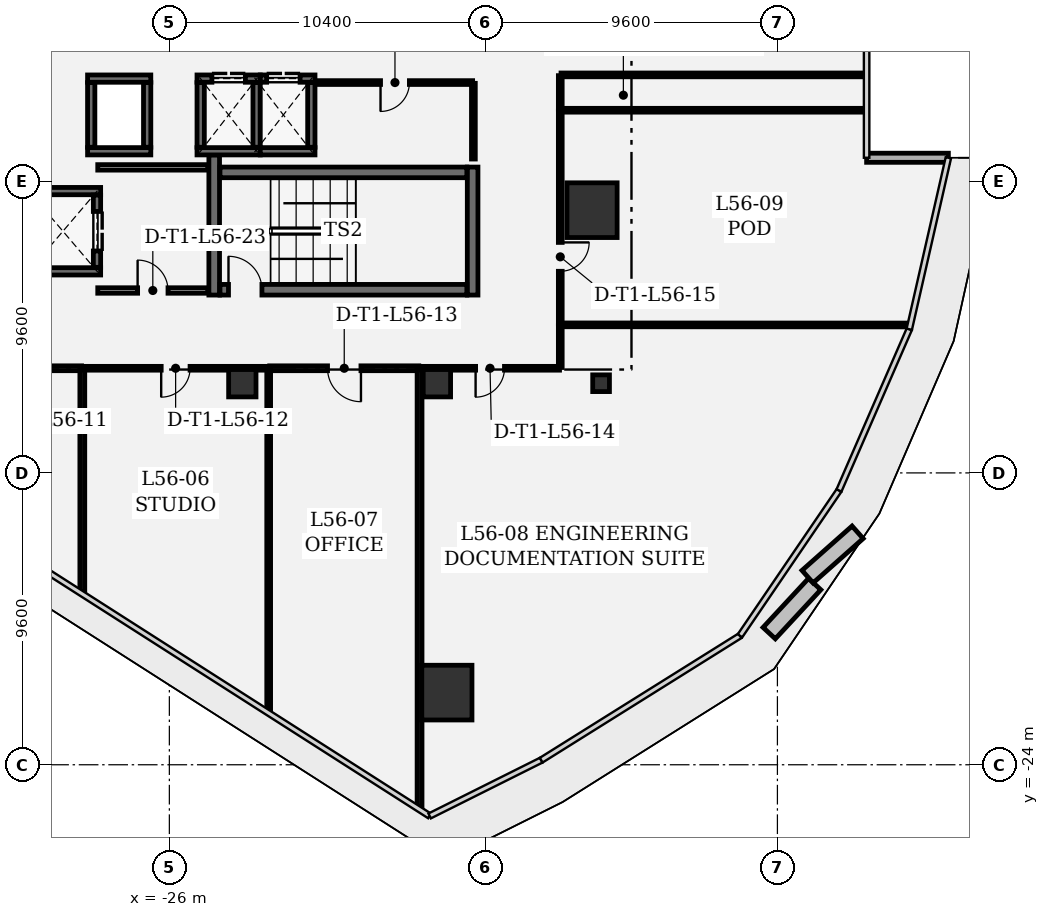
"""IFC4 building model, lengths in metres.
Left out: names, types, materials, properties, quantities, classifications, styles, units other than length and angle.
Written with IfcOpenShell. Run it as: python <this file> out.ifc"""

import sys

from ifc_helpers import new_model, si_unit, direction, frame, frame_2d, origin, origin_2d, place, context, subcontext, project, spatial, rectangle, extrude, element, fill, save


model = new_model("IFC4")
c1 = context("Model", 3, precision=1e-05, world=origin(), true_north=direction((0.0, 1.0)))
c2 = subcontext(c1, "Body", "Model", "MODEL_VIEW")
j1 = project(units=[si_unit("LENGTHUNIT", "METRE"), si_unit("PLANEANGLEUNIT", "RADIAN")], contexts=[c1])
p1 = place(None, origin())
s1 = spatial("IfcSite", under=j1, at=p1, CompositionType="ELEMENT")
p2 = place(p1, origin())
s2 = spatial("IfcBuilding", under=s1, at=p2, CompositionType="ELEMENT")
p3 = place(p2, frame((0.0, 0.0, 241.5)))
s3 = spatial("IfcBuildingStorey", under=s2, at=p3, CompositionType="ELEMENT", Elevation=241.5)
for number, where, z_axis, x_axis in (
    (1, (-16.872, -21.627, 0.0), (0.0, 0.0, 1.0), (1.0, 0.0, 0.0)),
    (2, (-12.097, -5.758, 0.0), (0.0, 0.0, 1.0), (1.0, 0.0, 0.0)),
):
    element("IfcColumn", number, at=place(p3, frame(where, z_axis=z_axis, x_axis=x_axis)), inside=s3, PredefinedType="COLUMN", context=c2, shape_type="SweptSolid", body=[
        extrude(rectangle(XDim=1.65, YDim=1.8, at=origin_2d()), origin(), (0.0, 0.0, 1.0), 4.05),
    ])
for number, where, z_axis, x_axis in (
    (3, (-17.2, -11.45, 0.0), (0.0, 0.0, 1.0), (1.0, 0.0, 0.0)),
    (4, (-23.6, -11.45, 0.0), (0.0, 0.0, 1.0), (1.0, 0.0, 0.0)),
):
    element("IfcColumn", number, at=place(p3, frame(where, z_axis=z_axis, x_axis=x_axis)), inside=s3, PredefinedType="COLUMN", context=c2, shape_type="SweptSolid", body=[
        extrude(rectangle(XDim=0.9, YDim=0.9, at=origin_2d()), origin(), (0.0, 0.0, 1.0), 4.05),
    ])
p4 = place(p3, frame((-11.8, -11.45, 0.0), z_axis=(0.0, 0.0, 1.0), x_axis=(1.0, 0.0, 0.0)))
e5 = element("IfcColumn", 5, at=p4, inside=s3, PredefinedType="COLUMN", context=c2, shape_type="SweptSolid", body=[
    extrude(rectangle(XDim=0.55, YDim=0.55, at=origin_2d()), origin(), (0.0, 0.0, 1.0), 4.05),
])
p5 = place(p3, frame((-0.377, -4.034, 0.0), z_axis=(0.0, 0.0, 1.0), x_axis=(-1.0, 0.0, 0.0)))
e6 = element("IfcWall", 6, at=p5, inside=s3, PredefinedType="SOLIDWALL", context=c2, shape_type="SweptSolid", body=[
    extrude(rectangle(XDim=2.689, YDim=0.3, at=frame_2d((1.345, 0.0))), origin(), (0.0, 0.0, 1.0), 3.78),
])
p6 = place(p3, frame((-24.525, -3.94, 0.0), z_axis=(0.0, 0.0, 1.0), x_axis=(0.0, -1.0, 0.0)))
e7 = element("IfcWall", 7, at=p6, inside=s3, PredefinedType="SHEAR", context=c2, shape_type="SweptSolid", body=[
    extrude(rectangle(XDim=4.61, YDim=0.35, at=frame_2d((2.305, 0.0))), origin(), (0.0, 0.0, 1.0), 3.78),
])
p7 = place(p3, frame((-16.025, -8.55, 0.0), z_axis=(0.0, 0.0, 1.0), x_axis=(0.0, 1.0, 0.0)))
e8 = element("IfcWall", 8, at=p7, inside=s3, PredefinedType="SHEAR", context=c2, shape_type="SweptSolid", body=[
    extrude(rectangle(XDim=4.21, YDim=0.35, at=frame_2d((2.105, 0.0))), origin(), (0.0, 0.0, 1.0), 3.78),
])
p8 = place(p3, frame((-24.335, -8.375, 0.0), z_axis=(0.0, 0.0, 1.0), x_axis=(1.0, 0.0, 0.0)))
e9 = element("IfcWall", 9, at=p8, inside=s3, PredefinedType="SHEAR", context=c2, shape_type="SweptSolid", body=[
    extrude(rectangle(XDim=8.12, YDim=0.35, at=frame_2d((4.06, 0.0))), origin(), (0.0, 0.0, 1.0), 3.78),
])
p9 = place(p8, frame((0.28, 0.0, 0.0)))
e10 = element("IfcOpeningElement", 10, at=p9, cuts=e9, PredefinedType="OPENING", context=c2, shape_type="SweptSolid", body=[
    extrude(rectangle(XDim=1.1, YDim=2.2, at=frame_2d((0.55, 1.1))), frame((0.0, 0.185, 0.0), z_axis=(0.0, -1.0, 0.0), x_axis=(1.0, 0.0, 0.0)), (0.0, 0.0, 1.0), 0.37),
])
p10 = place(p3, frame((-16.215, -4.515, 0.0), z_axis=(0.0, 0.0, 1.0), x_axis=(-1.0, 0.0, 0.0)))
e11 = element("IfcWall", 11, at=p10, inside=s3, PredefinedType="SHEAR", context=c2, shape_type="SweptSolid", body=[
    extrude(rectangle(XDim=8.12, YDim=0.35, at=frame_2d((4.06, 0.0))), origin(), (0.0, 0.0, 1.0), 3.78),
])
for number, where, z_axis, x_axis in (
    (12, (-28.26, -7.77, 0.0), (0.0, 0.0, 1.0), (-1.0, 0.0, 0.0)),
    (13, (-30.74, -5.13, 0.0), (0.0, 0.0, 1.0), (1.0, 0.0, 0.0)),
):
    element("IfcWall", number, at=place(p3, frame(where, z_axis=z_axis, x_axis=x_axis)), inside=s3, PredefinedType="SHEAR", context=c2, shape_type="SweptSolid", body=[
        extrude(rectangle(XDim=2.48, YDim=0.24, at=frame_2d((1.24, 0.0))), origin(), (0.0, 0.0, 1.0), 3.78),
    ])
p11 = place(p3, frame((-28.38, -5.262, 0.0), z_axis=(0.0, 0.0, 1.0), x_axis=(0.0, -1.0, 0.0)))
e14 = element("IfcWall", 14, at=p11, inside=s3, PredefinedType="SHEAR", context=c2, shape_type="SweptSolid", body=[
    extrude(rectangle(XDim=2.376, YDim=0.24, at=frame_2d((1.188, 0.0))), origin(), (0.0, 0.0, 1.0), 3.78),
])
p12 = place(p11, frame((0.538, 0.0, 0.0)))
e15 = element("IfcOpeningElement", 15, at=p12, cuts=e14, PredefinedType="OPENING", context=c2, shape_type="SweptSolid", body=[
    extrude(rectangle(XDim=1.3, YDim=2.3, at=frame_2d((0.65, 1.15))), frame((0.0, 0.13, 0.0), z_axis=(0.0, -1.0, 0.0), x_axis=(1.0, 0.0, 0.0)), (0.0, 0.0, 1.0), 0.26),
])
for number, where, z_axis, x_axis in (
    (16, (-26.61, -3.82, 0.0), (0.0, 0.0, 1.0), (-1.0, 0.0, 0.0)),
    (17, (-28.69, -1.43, 0.0), (0.0, 0.0, 1.0), (1.0, 0.0, 0.0)),
):
    element("IfcWall", number, at=place(p3, frame(where, z_axis=z_axis, x_axis=x_axis)), inside=s3, PredefinedType="SHEAR", context=c2, shape_type="SweptSolid", body=[
        extrude(rectangle(XDim=2.08, YDim=0.24, at=frame_2d((1.04, 0.0))), origin(), (0.0, 0.0, 1.0), 3.78),
    ])
for number, where, z_axis, x_axis in (
    (18, (-28.57, -3.688, 0.0), (0.0, 0.0, 1.0), (0.0, 1.0, 0.0)),
    (19, (-26.73, -1.562, 0.0), (0.0, 0.0, 1.0), (0.0, -1.0, 0.0)),
):
    element("IfcWall", number, at=place(p3, frame(where, z_axis=z_axis, x_axis=x_axis)), inside=s3, PredefinedType="SHEAR", context=c2, shape_type="SweptSolid", body=[
        extrude(rectangle(XDim=2.126, YDim=0.24, at=frame_2d((1.063, 0.0))), origin(), (0.0, 0.0, 1.0), 3.78),
    ])
p13 = place(p3, frame((-23.01, -3.82, 0.0), z_axis=(0.0, 0.0, 1.0), x_axis=(-1.0, 0.0, 0.0)))
e20 = element("IfcWall", 20, at=p13, inside=s3, PredefinedType="SHEAR", context=c2, shape_type="SweptSolid", body=[
    extrude(rectangle(XDim=2.08, YDim=0.24, at=frame_2d((1.04, 0.0))), origin(), (0.0, 0.0, 1.0), 3.78),
])
p14 = place(p3, frame((-25.09, -1.43, 0.0), z_axis=(0.0, 0.0, 1.0), x_axis=(1.0, 0.0, 0.0)))
e21 = element("IfcWall", 21, at=p14, inside=s3, PredefinedType="SHEAR", context=c2, shape_type="SweptSolid", body=[
    extrude(rectangle(XDim=2.08, YDim=0.24, at=frame_2d((1.04, 0.0))), origin(), (0.0, 0.0, 1.0), 3.78),
])
p15 = place(p14, frame((0.49, 0.0, 0.0)))
e22 = element("IfcOpeningElement", 22, at=p15, cuts=e21, PredefinedType="OPENING", context=c2, shape_type="SweptSolid", body=[
    extrude(rectangle(XDim=1.1, YDim=2.2, at=frame_2d((0.55, 1.1))), frame((0.0, 0.13, 0.0), z_axis=(0.0, -1.0, 0.0), x_axis=(1.0, 0.0, 0.0)), (0.0, 0.0, 1.0), 0.26),
])
for number, where, z_axis, x_axis in (
    (23, (-24.97, -3.688, 0.0), (0.0, 0.0, 1.0), (0.0, 1.0, 0.0)),
    (24, (-23.13, -1.562, 0.0), (0.0, 0.0, 1.0), (0.0, -1.0, 0.0)),
):
    element("IfcWall", number, at=place(p3, frame(where, z_axis=z_axis, x_axis=x_axis)), inside=s3, PredefinedType="SHEAR", context=c2, shape_type="SweptSolid", body=[
        extrude(rectangle(XDim=2.126, YDim=0.24, at=frame_2d((1.063, 0.0))), origin(), (0.0, 0.0, 1.0), 3.78),
    ])
p16 = place(p3, frame((-21.21, -3.82, 0.0), z_axis=(0.0, 0.0, 1.0), x_axis=(-1.0, 0.0, 0.0)))
e25 = element("IfcWall", 25, at=p16, inside=s3, PredefinedType="SHEAR", context=c2, shape_type="SweptSolid", body=[
    extrude(rectangle(XDim=1.8, YDim=0.24, at=frame_2d((0.9, 0.0))), origin(), (0.0, 0.0, 1.0), 3.78),
])
p17 = place(p3, frame((-23.01, -1.43, 0.0), z_axis=(0.0, 0.0, 1.0), x_axis=(1.0, 0.0, 0.0)))
e26 = element("IfcWall", 26, at=p17, inside=s3, PredefinedType="SHEAR", context=c2, shape_type="SweptSolid", body=[
    extrude(rectangle(XDim=1.8, YDim=0.24, at=frame_2d((0.9, 0.0))), origin(), (0.0, 0.0, 1.0), 3.78),
])
p18 = place(p17, frame((0.21, 0.0, 0.0)))
e27 = element("IfcOpeningElement", 27, at=p18, cuts=e26, PredefinedType="OPENING", context=c2, shape_type="SweptSolid", body=[
    extrude(rectangle(XDim=1.1, YDim=2.2, at=frame_2d((0.55, 1.1))), frame((0.0, 0.13, 0.0), z_axis=(0.0, -1.0, 0.0), x_axis=(1.0, 0.0, 0.0)), (0.0, 0.0, 1.0), 0.26),
])
p19 = place(p3, frame((-21.33, -1.562, 0.0), z_axis=(0.0, 0.0, 1.0), x_axis=(0.0, -1.0, 0.0)))
e28 = element("IfcWall", 28, at=p19, inside=s3, PredefinedType="SHEAR", context=c2, shape_type="SweptSolid", body=[
    extrude(rectangle(XDim=2.126, YDim=0.24, at=frame_2d((1.063, 0.0))), origin(), (0.0, 0.0, 1.0), 3.78),
])
p20 = place(p3, frame((-28.355, -8.4, 0.0), z_axis=(0.0, 0.0, 1.0), x_axis=(1.0, 0.0, 0.0)))
e29 = element("IfcWall", 29, at=p20, inside=s3, PredefinedType="PARTITIONING", context=c2, shape_type="SweptSolid", body=[
    extrude(rectangle(XDim=3.622, YDim=0.18, at=frame_2d((1.811, 0.0))), origin(), (0.0, 0.0, 1.0), 3.78),
])
p21 = place(p20, frame((1.311, 0.0, 0.0)))
e30 = element("IfcOpeningElement", 30, at=p21, cuts=e29, PredefinedType="OPENING", context=c2, shape_type="SweptSolid", body=[
    extrude(rectangle(XDim=1.0, YDim=2.15, at=frame_2d((0.5, 1.075))), frame((0.0, 0.1, 0.0), z_axis=(0.0, -1.0, 0.0), x_axis=(1.0, 0.0, 0.0)), (0.0, 0.0, 1.0), 0.2),
])
p22 = place(p3, frame((-24.733, -4.35, 0.0), z_axis=(0.0, 0.0, 1.0), x_axis=(-1.0, 0.0, 0.0)))
e31 = element("IfcWall", 31, at=p22, inside=s3, PredefinedType="PARTITIONING", context=c2, shape_type="SweptSolid", body=[
    extrude(rectangle(XDim=3.622, YDim=0.18, at=frame_2d((1.811, 0.0))), origin(), (0.0, 0.0, 1.0), 3.78),
])
p23 = place(p3, frame((-16.0, -4.075, 0.0), z_axis=(0.0, 0.0, 1.0), x_axis=(0.0, 1.0, 0.0)))
e32 = element("IfcWall", 32, at=p23, inside=s3, PredefinedType="PARTITIONING", context=c2, shape_type="SweptSolid", body=[
    extrude(rectangle(XDim=2.49, YDim=0.125, at=frame_2d((1.245, 0.0))), origin(), (0.0, 0.0, 1.0), 3.78),
])
p24 = place(p3, frame((-16.025, -1.56, 0.0), z_axis=(0.0, 0.0, 1.0), x_axis=(-1.0, 0.0, 0.0)))
e33 = element("IfcWall", 33, at=p24, inside=s3, PredefinedType="PARTITIONING", context=c2, shape_type="SweptSolid", body=[
    extrude(rectangle(XDim=5.109, YDim=0.125, at=frame_2d((2.554, 0.0))), origin(), (0.0, 0.0, 1.0), 3.78),
])
p25 = place(p24, frame((2.079, 0.0, 0.0)))
e34 = element("IfcOpeningElement", 34, at=p25, cuts=e33, PredefinedType="OPENING", context=c2, shape_type="SweptSolid", body=[
    extrude(rectangle(XDim=0.95, YDim=2.15, at=frame_2d((0.475, 1.075))), frame((0.0, 0.073, 0.0), z_axis=(0.0, -1.0, 0.0), x_axis=(1.0, 0.0, 0.0)), (0.0, 0.0, 1.0), 0.145),
])
p26 = place(p3, frame((-28.888, -10.958, 0.0), z_axis=(0.0, 0.0, 1.0), x_axis=(-1.0, 0.0, 0.0)))
e35 = element("IfcWall", 35, at=p26, inside=s3, PredefinedType="PARTITIONING", context=c2, shape_type="SweptSolid", body=[
    extrude(rectangle(XDim=5.737, YDim=0.16, at=frame_2d((2.869, 0.0))), origin(), (0.0, 0.0, 1.0), 3.0),
])
p27 = place(p26, frame((2.319, 0.0, 0.0)))
e36 = element("IfcOpeningElement", 36, at=p27, cuts=e35, PredefinedType="OPENING", context=c2, shape_type="SweptSolid", body=[
    extrude(rectangle(XDim=1.1, YDim=2.15, at=frame_2d((0.55, 1.075))), frame((0.0, 0.09, 0.0), z_axis=(0.0, -1.0, 0.0), x_axis=(1.0, 0.0, 0.0)), (0.0, 0.0, 1.0), 0.18),
])
p28 = place(p3, frame((-28.863, -18.302, 0.0), z_axis=(0.0, 0.0, 1.0), x_axis=(0.0, 1.0, 0.0)))
e37 = element("IfcWall", 37, at=p28, inside=s3, PredefinedType="PARTITIONING", context=c2, shape_type="SweptSolid", body=[
    extrude(rectangle(XDim=7.319, YDim=0.16, at=frame_2d((3.66, 0.0))), origin(), (0.0, 0.0, 1.0), 3.78),
])
p29 = place(p3, frame((-22.758, -10.958, 0.0), z_axis=(0.0, 0.0, 1.0), x_axis=(-1.0, 0.0, 0.0)))
e38 = element("IfcWall", 38, at=p29, inside=s3, PredefinedType="PARTITIONING", context=c2, shape_type="SweptSolid", body=[
    extrude(rectangle(XDim=6.072, YDim=0.125, at=frame_2d((3.036, 0.0))), origin(), (0.0, 0.0, 1.0), 3.78),
])
p30 = place(p29, frame((2.561, 0.0, 0.0)))
e39 = element("IfcOpeningElement", 39, at=p30, cuts=e38, PredefinedType="OPENING", context=c2, shape_type="SweptSolid", body=[
    extrude(rectangle(XDim=0.95, YDim=2.15, at=frame_2d((0.475, 1.075))), frame((0.0, 0.073, 0.0), z_axis=(0.0, -1.0, 0.0), x_axis=(1.0, 0.0, 0.0)), (0.0, 0.0, 1.0), 0.145),
])
p31 = place(p3, frame((-22.733, -22.22, 0.0), z_axis=(0.0, 0.0, 1.0), x_axis=(0.0, 1.0, 0.0)))
e40 = element("IfcWall", 40, at=p31, inside=s3, PredefinedType="PARTITIONING", context=c2, shape_type="SweptSolid", body=[
    extrude(rectangle(XDim=11.237, YDim=0.125, at=frame_2d((5.619, 0.0))), origin(), (0.0, 0.0, 1.0), 2.977),
])
p32 = place(p3, frame((-17.795, -10.958, 0.0), z_axis=(0.0, 0.0, 1.0), x_axis=(-1.0, 0.0, 0.0)))
e41 = element("IfcWall", 41, at=p32, inside=s3, PredefinedType="PARTITIONING", context=c2, shape_type="SweptSolid", body=[
    extrude(rectangle(XDim=4.905, YDim=0.16, at=frame_2d((2.452, 0.0))), origin(), (0.0, 0.0, 1.0), 3.344),
])
p33 = place(p32, frame((1.902, 0.0, 0.0)))
e42 = element("IfcOpeningElement", 42, at=p33, cuts=e41, PredefinedType="OPENING", context=c2, shape_type="SweptSolid", body=[
    extrude(rectangle(XDim=1.1, YDim=2.15, at=frame_2d((0.55, 1.075))), frame((0.0, 0.09, 0.0), z_axis=(0.0, -1.0, 0.0), x_axis=(1.0, 0.0, 0.0)), (0.0, 0.0, 1.0), 0.18),
])
p34 = place(p3, frame((-17.77, -25.392, 0.0), z_axis=(0.0, 0.0, 1.0), x_axis=(0.0, 1.0, 0.0)))
e43 = element("IfcWall", 43, at=p34, inside=s3, PredefinedType="PARTITIONING", context=c2, shape_type="SweptSolid", body=[
    extrude(rectangle(XDim=14.409, YDim=0.16, at=frame_2d((7.205, 0.0))), origin(), (0.0, 0.0, 1.0), 2.977),
])
p35 = place(p3, frame((-1.711, -9.534, 0.0), z_axis=(0.0, 0.0, 1.0), x_axis=(-0.99999991731, 0.000406669344, 0.0)))
e44 = element("IfcWall", 44, at=p35, inside=s3, PredefinedType="PARTITIONING", context=c2, shape_type="SweptSolid", body=[
    extrude(rectangle(XDim=11.406, YDim=0.125, at=frame_2d((5.703, 0.0))), origin(), (0.0, 0.0, 1.0), 3.78),
])
p36 = place(p3, frame((-13.142, -9.555, 0.0), z_axis=(0.0, 0.0, 1.0), x_axis=(0.0, -1.0, 0.0)))
e45 = element("IfcWall", 45, at=p36, inside=s3, PredefinedType="PARTITIONING", context=c2, shape_type="SweptSolid", body=[
    extrude(rectangle(XDim=1.378, YDim=0.125, at=frame_2d((0.689, 0.0))), origin(), (0.0, 0.0, 1.0), 3.0),
])
p37 = place(p3, frame((-13.167, -10.958, 0.0), z_axis=(0.0, 0.0, 1.0), x_axis=(-1.0, 0.0, 0.0)))
e46 = element("IfcWall", 46, at=p37, inside=s3, PredefinedType="PARTITIONING", context=c2, shape_type="SweptSolid", body=[
    extrude(rectangle(XDim=4.57, YDim=0.125, at=frame_2d((2.285, 0.0))), origin(), (0.0, 0.0, 1.0), 3.344),
])
p38 = place(p37, frame((1.81, 0.0, 0.0)))
e47 = element("IfcOpeningElement", 47, at=p38, cuts=e46, PredefinedType="OPENING", context=c2, shape_type="SweptSolid", body=[
    extrude(rectangle(XDim=0.95, YDim=2.15, at=frame_2d((0.475, 1.075))), frame((0.0, 0.073, 0.0), z_axis=(0.0, -1.0, 0.0), x_axis=(1.0, 0.0, 0.0)), (0.0, 0.0, 1.0), 0.145),
])
p39 = place(p3, frame((-3.146, -2.47, 0.0), z_axis=(0.0, 0.0, 1.0), x_axis=(-1.0, 0.0, 0.0)))
e48 = element("IfcWall", 48, at=p39, inside=s3, PredefinedType="PARTITIONING", context=c2, shape_type="SweptSolid", body=[
    extrude(rectangle(XDim=9.971, YDim=0.125, at=frame_2d((4.985, 0.0))), origin(), (0.0, 0.0, 1.0), 3.78),
])
p40 = place(p3, frame((-13.142, -2.496, 0.0), z_axis=(0.0, 0.0, 1.0), x_axis=(0.0, -1.0, 0.0)))
e49 = element("IfcWall", 49, at=p40, inside=s3, PredefinedType="PARTITIONING", context=c2, shape_type="SweptSolid", body=[
    extrude(rectangle(XDim=7.001, YDim=0.125, at=frame_2d((3.501, 0.0))), origin(), (0.0, 0.0, 1.0), 3.0),
])
p41 = place(p40, frame((4.323, 0.0, 0.0)))
e50 = element("IfcOpeningElement", 50, at=p41, cuts=e49, PredefinedType="OPENING", context=c2, shape_type="SweptSolid", body=[
    extrude(rectangle(XDim=0.95, YDim=2.15, at=frame_2d((0.475, 1.075))), frame((0.0, 0.073, 0.0), z_axis=(0.0, -1.0, 0.0), x_axis=(1.0, 0.0, 0.0)), (0.0, 0.0, 1.0), 0.145),
])
p42 = place(p3, frame((-13.117, -1.308, 0.0), z_axis=(0.0, 0.0, 1.0), x_axis=(1.0, 0.0, 0.0)))
e51 = element("IfcWall", 51, at=p42, inside=s3, PredefinedType="PARTITIONING", context=c2, shape_type="SweptSolid", body=[
    extrude(rectangle(XDim=9.971, YDim=0.125, at=frame_2d((4.985, 0.0))), origin(), (0.0, 0.0, 1.0), 3.78),
])
p43 = place(p3, frame((-13.142, -1.333, 0.0), z_axis=(0.0, 0.0, 1.0), x_axis=(0.0, -1.0, 0.0)))
e52 = element("IfcWall", 52, at=p43, inside=s3, PredefinedType="PARTITIONING", context=c2, shape_type="SweptSolid", body=[
    extrude(rectangle(XDim=1.104, YDim=0.125, at=frame_2d((0.552, 0.0))), origin(), (0.0, 0.0, 1.0), 3.78),
])
p44 = place(p9, origin())
e53 = element("IfcDoor", 53, at=p44, inside=s3, OperationType="SINGLE_SWING_LEFT", PredefinedType="DOOR", context=c2, shape_type="SweptSolid", body=[
    extrude(rectangle(XDim=1.1, YDim=2.2, at=frame_2d((0.55, 1.1))), frame((0.0, 0.025, 0.0), z_axis=(0.0, -1.0, 0.0), x_axis=(1.0, 0.0, 0.0)), (0.0, 0.0, 1.0), 0.05),
])
fill(e10, e53)
p45 = place(p12, origin())
e54 = element("IfcDoor", 54, at=p45, inside=s3, OperationType="DOUBLE_DOOR_SLIDING", PredefinedType="DOOR", context=c2, shape_type="SweptSolid", body=[
    extrude(rectangle(XDim=1.3, YDim=2.3, at=frame_2d((0.65, 1.15))), frame((0.0, 0.025, 0.0), z_axis=(0.0, -1.0, 0.0), x_axis=(1.0, 0.0, 0.0)), (0.0, 0.0, 1.0), 0.05),
])
fill(e15, e54)
p46 = place(p15, origin())
e55 = element("IfcDoor", 55, at=p46, inside=s3, OperationType="DOUBLE_DOOR_SLIDING", PredefinedType="DOOR", context=c2, shape_type="SweptSolid", body=[
    extrude(rectangle(XDim=1.1, YDim=2.2, at=frame_2d((0.55, 1.1))), frame((0.0, 0.025, 0.0), z_axis=(0.0, -1.0, 0.0), x_axis=(1.0, 0.0, 0.0)), (0.0, 0.0, 1.0), 0.05),
])
fill(e22, e55)
p47 = place(p18, origin())
e56 = element("IfcDoor", 56, at=p47, inside=s3, OperationType="DOUBLE_DOOR_SLIDING", PredefinedType="DOOR", context=c2, shape_type="SweptSolid", body=[
    extrude(rectangle(XDim=1.1, YDim=2.2, at=frame_2d((0.55, 1.1))), frame((0.0, 0.025, 0.0), z_axis=(0.0, -1.0, 0.0), x_axis=(1.0, 0.0, 0.0)), (0.0, 0.0, 1.0), 0.05),
])
fill(e27, e56)
p48 = place(p25, origin())
e57 = element("IfcDoor", 57, at=p48, inside=s3, OperationType="SINGLE_SWING_RIGHT", PredefinedType="DOOR", context=c2, shape_type="SweptSolid", body=[
    extrude(rectangle(XDim=0.95, YDim=2.15, at=frame_2d((0.475, 1.075))), frame((0.0, 0.025, 0.0), z_axis=(0.0, -1.0, 0.0), x_axis=(1.0, 0.0, 0.0)), (0.0, 0.0, 1.0), 0.05),
])
fill(e34, e57)
p49 = place(p30, origin())
e58 = element("IfcDoor", 58, at=p49, inside=s3, OperationType="SINGLE_SWING_RIGHT", PredefinedType="DOOR", context=c2, shape_type="SweptSolid", body=[
    extrude(rectangle(XDim=0.95, YDim=2.15, at=frame_2d((0.475, 1.075))), frame((0.0, 0.025, 0.0), z_axis=(0.0, -1.0, 0.0), x_axis=(1.0, 0.0, 0.0)), (0.0, 0.0, 1.0), 0.05),
])
fill(e39, e58)
p50 = place(p33, origin())
e59 = element("IfcDoor", 59, at=p50, inside=s3, OperationType="SINGLE_SWING_LEFT", PredefinedType="DOOR", context=c2, shape_type="SweptSolid", body=[
    extrude(rectangle(XDim=1.1, YDim=2.15, at=frame_2d((0.55, 1.075))), frame((0.0, 0.025, 0.0), z_axis=(0.0, -1.0, 0.0), x_axis=(1.0, 0.0, 0.0)), (0.0, 0.0, 1.0), 0.05),
])
fill(e42, e59)
p51 = place(p38, origin())
e60 = element("IfcDoor", 60, at=p51, inside=s3, OperationType="SINGLE_SWING_RIGHT", PredefinedType="DOOR", context=c2, shape_type="SweptSolid", body=[
    extrude(rectangle(XDim=0.95, YDim=2.15, at=frame_2d((0.475, 1.075))), frame((0.0, 0.025, 0.0), z_axis=(0.0, -1.0, 0.0), x_axis=(1.0, 0.0, 0.0)), (0.0, 0.0, 1.0), 0.05),
])
fill(e47, e60)
p52 = place(p41, origin())
e61 = element("IfcDoor", 61, at=p52, inside=s3, OperationType="SINGLE_SWING_LEFT", PredefinedType="DOOR", context=c2, shape_type="SweptSolid", body=[
    extrude(rectangle(XDim=0.95, YDim=2.15, at=frame_2d((0.475, 1.075))), frame((0.0, 0.025, 0.0), z_axis=(0.0, -1.0, 0.0), x_axis=(1.0, 0.0, 0.0)), (0.0, 0.0, 1.0), 0.05),
])
fill(e50, e61)
p53 = place(p21, origin())
e62 = element("IfcDoor", 62, at=p53, inside=s3, OperationType="SINGLE_SWING_LEFT", PredefinedType="DOOR", context=c2, shape_type="SweptSolid", body=[
    extrude(rectangle(XDim=1.0, YDim=2.15, at=frame_2d((0.5, 1.075))), frame((0.0, 0.025, 0.0), z_axis=(0.0, -1.0, 0.0), x_axis=(1.0, 0.0, 0.0)), (0.0, 0.0, 1.0), 0.05),
])
fill(e30, e62)
save(model, sys.argv[1])
